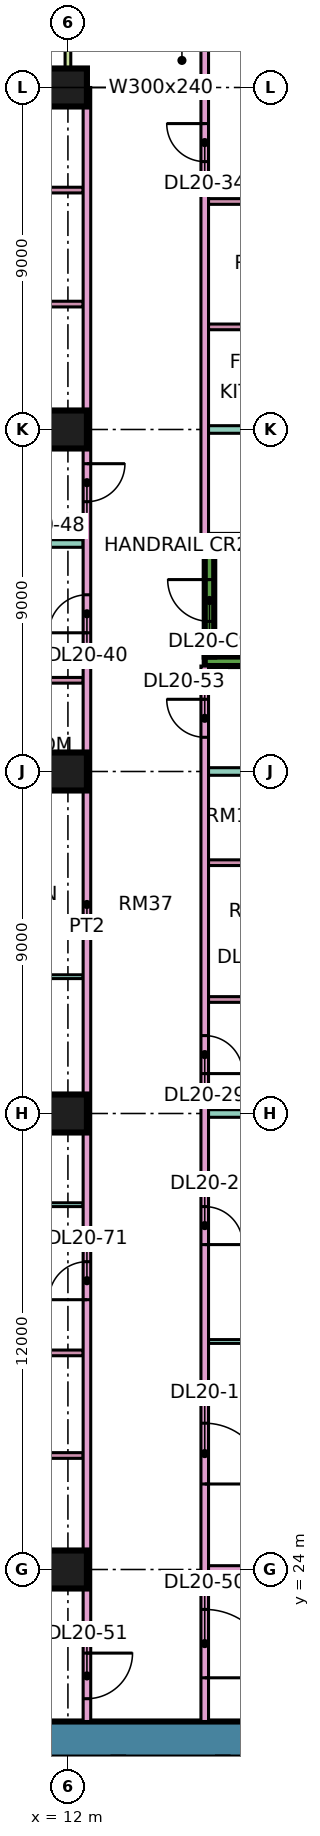
"""IFC4 building model, lengths in metres.
Left out: names, types, materials, properties, quantities, classifications, styles, units other than length and angle.
Written with IfcOpenShell. Run it as: python <this file> out.ifc"""

import sys

from ifc_helpers import new_model, si_unit, direction, frame, frame_2d, origin, origin_2d, place, context, subcontext, project, spatial, rectangle, extrude, element, fill, save


model = new_model("IFC4")
c1 = context("Model", 3, precision=1e-05, world=origin(), true_north=direction((0.0, 1.0)))
c2 = subcontext(c1, "Body", "Model", "MODEL_VIEW")
j1 = project(units=[si_unit("LENGTHUNIT", "METRE"), si_unit("PLANEANGLEUNIT", "RADIAN")], contexts=[c1])
p1 = place(None, origin())
s1 = spatial("IfcSite", under=j1, at=p1, CompositionType="ELEMENT")
p2 = place(p1, origin())
s2 = spatial("IfcBuilding", under=s1, at=p2, CompositionType="ELEMENT")
p3 = place(p2, frame((0.0, 0.0, 91.9)))
s3 = spatial("IfcBuildingStorey", under=s2, at=p3, CompositionType="ELEMENT", Elevation=91.9)
for number, where, z_axis, x_axis in (
    (1, (12.0, 24.0, 0.0), (0.0, 0.0, 1.0), (1.0, 0.0, 0.0)),
    (2, (12.0, 36.0, 0.0), (0.0, 0.0, 1.0), (1.0, 0.0, 0.0)),
    (3, (12.0, 45.0, 0.0), (0.0, 0.0, 1.0), (1.0, 0.0, 0.0)),
    (4, (12.0, 54.0, 0.0), (0.0, 0.0, 1.0), (1.0, 0.0, 0.0)),
    (5, (12.0, 63.0, 0.0), (0.0, 0.0, 1.0), (1.0, 0.0, 0.0)),
):
    element("IfcColumn", number, at=place(p3, frame(where, z_axis=z_axis, x_axis=x_axis)), inside=s3, PredefinedType="COLUMN", context=c2, shape_type="SweptSolid", body=[
        extrude(rectangle(XDim=1.0, YDim=1.0, at=origin_2d()), origin(), (0.0, 0.0, 1.0), 3.75),
    ])
p4 = place(p3, frame((9.0, 19.525, 0.0), z_axis=(0.0, 0.0, 1.0), x_axis=(1.0, 0.0, 0.0)))
e6 = element("IfcWall", 6, at=p4, inside=s3, PredefinedType="SHEAR", context=c2, shape_type="SweptSolid", body=[
    extrude(rectangle(XDim=25.0, YDim=0.95, at=frame_2d((12.5, 0.0))), origin(), (0.0, 0.0, 1.0), 3.75),
])
p5 = place(p4, frame((19.1, 0.0, 0.0)))
e7 = element("IfcOpeningElement", 7, at=p5, cuts=e6, PredefinedType="OPENING", context=c2, shape_type="SweptSolid", body=[
    extrude(rectangle(XDim=1.8, YDim=2.4, at=frame_2d((0.9, 1.2))), frame((0.0, 0.485, 0.0), z_axis=(0.0, -1.0, 0.0), x_axis=(1.0, 0.0, 0.0)), (0.0, 0.0, 1.0), 0.97),
])
for number, where, z_axis, x_axis in (
    (8, (15.6, 47.9, 0.0), (0.0, 0.0, 1.0), (1.0, 0.0, 0.0)),
    (9, (15.6, 51.1, 0.0), (0.0, 0.0, 1.0), (1.0, 0.0, 0.0)),
):
    element("IfcWall", number, at=place(p3, frame(where, z_axis=z_axis, x_axis=x_axis)), inside=s3, PredefinedType="SHEAR", context=c2, shape_type="SweptSolid", body=[
        extrude(rectangle(XDim=7.0, YDim=0.25, at=frame_2d((3.5, 0.0))), origin(), (0.0, 0.0, 1.0), 3.75),
    ])
p6 = place(p3, frame((15.725, 48.025, 0.0), z_axis=(0.0, 0.0, 1.0), x_axis=(0.0, 1.0, 0.0)))
e10 = element("IfcWall", 10, at=p6, inside=s3, PredefinedType="SHEAR", context=c2, shape_type="SweptSolid", body=[
    extrude(rectangle(XDim=2.95, YDim=0.25, at=frame_2d((1.475, 0.0))), origin(), (0.0, 0.0, 1.0), 3.75),
])
p7 = place(p6, frame((0.925, 0.0, 0.0)))
e11 = element("IfcOpeningElement", 11, at=p7, cuts=e10, PredefinedType="OPENING", context=c2, shape_type="SweptSolid", body=[
    extrude(rectangle(XDim=1.1, YDim=2.2, at=frame_2d((0.55, 1.1))), frame((0.0, 0.135, 0.0), z_axis=(0.0, -1.0, 0.0), x_axis=(1.0, 0.0, 0.0)), (0.0, 0.0, 1.0), 0.27),
])
p8 = place(p3, frame((11.925, 63.0, 0.0), z_axis=(0.0, 0.0, 1.0), x_axis=(-1.0, 0.0, 0.0)))
e12 = element("IfcWall", 12, at=p8, inside=s3, PredefinedType="SOLIDWALL", context=c2, shape_type="SweptSolid", body=[
    extrude(rectangle(XDim=10.35, YDim=0.15, at=frame_2d((5.175, 0.0))), origin(), (0.0, 0.0, 1.0), 3.35),
])
p9 = place(p8, frame((1.175, 0.0, 0.45)))
e13 = element("IfcOpeningElement", 13, at=p9, cuts=e12, PredefinedType="OPENING", context=c2, shape_type="SweptSolid", body=[
    extrude(rectangle(XDim=3.0, YDim=2.4, at=frame_2d((1.5, 1.2))), frame((0.0, 0.085, 0.0), z_axis=(0.0, -1.0, 0.0), x_axis=(1.0, 0.0, 0.0)), (0.0, 0.0, 1.0), 0.17),
])
p10 = place(p8, frame((6.688, 0.0, 0.0)))
e14 = element("IfcOpeningElement", 14, at=p10, cuts=e12, PredefinedType="OPENING", context=c2, shape_type="SweptSolid", body=[
    extrude(rectangle(XDim=1.8, YDim=2.4, at=frame_2d((0.9, 1.2))), frame((0.0, 0.085, 0.0), z_axis=(0.0, -1.0, 0.0), x_axis=(1.0, 0.0, 0.0)), (0.0, 0.0, 1.0), 0.17),
])
p11 = place(p3, frame((12.0, 64.5, 0.0), z_axis=(0.0, 0.0, 1.0), x_axis=(0.0, -1.0, 0.0)))
e15 = element("IfcWall", 15, at=p11, inside=s3, PredefinedType="SOLIDWALL", context=c2, shape_type="SweptSolid", body=[
    extrude(rectangle(XDim=1.5, YDim=0.15, at=frame_2d((0.75, 0.0))), origin(), (0.0, 0.0, 1.0), 3.35),
])
p12 = place(p3, frame((-1.35, 22.4, 0.0), z_axis=(0.0, 0.0, 1.0), x_axis=(1.0, 0.0, 0.0)))
e16 = element("IfcWall", 16, at=p12, inside=s3, PredefinedType="PARTITIONING", context=c2, shape_type="SweptSolid", body=[
    extrude(rectangle(XDim=13.75, YDim=0.2, at=frame_2d((6.875, 0.0))), origin(), (0.0, 0.0, 1.0), 3.35),
])
p13 = place(p3, frame((0.0, 36.0, 0.0), z_axis=(0.0, 0.0, 1.0), x_axis=(1.0, 0.0, 0.0)))
e17 = element("IfcWall", 17, at=p13, inside=s3, PredefinedType="PARTITIONING", context=c2, shape_type="SweptSolid", body=[
    extrude(rectangle(XDim=12.4, YDim=0.2, at=frame_2d((6.2, 0.0))), origin(), (0.0, 0.0, 1.0), 3.35),
])
p14 = place(p3, frame((0.074, 51.0, 0.0), z_axis=(0.0, 0.0, 1.0), x_axis=(1.0, 0.0, 0.0)))
e18 = element("IfcWall", 18, at=p14, inside=s3, PredefinedType="PARTITIONING", context=c2, shape_type="SweptSolid", body=[
    extrude(rectangle(XDim=12.326, YDim=0.2, at=frame_2d((6.163, 0.0))), origin(), (0.0, 0.0, 1.0), 3.35),
])
p15 = place(p3, frame((7.05, 33.6, 0.0), z_axis=(0.0, 0.0, 1.0), x_axis=(1.0, 0.0, 0.0)))
e19 = element("IfcWall", 19, at=p15, inside=s3, PredefinedType="PARTITIONING", context=c2, shape_type="SweptSolid", body=[
    extrude(rectangle(XDim=5.35, YDim=0.1, at=frame_2d((2.675, 0.0))), origin(), (0.0, 0.0, 1.0), 3.35),
])
for number, where, z_axis, x_axis in (
    (20, (7.175, 27.0, 0.0), (0.0, 0.0, 1.0), (1.0, 0.0, 0.0)),
    (21, (7.175, 29.7, 0.0), (0.0, 0.0, 1.0), (1.0, 0.0, 0.0)),
    (22, (7.175, 54.3, 0.0), (0.0, 0.0, 1.0), (1.0, 0.0, 0.0)),
    (23, (7.175, 57.3, 0.0), (0.0, 0.0, 1.0), (1.0, 0.0, 0.0)),
    (24, (7.175, 60.3, 0.0), (0.0, 0.0, 1.0), (1.0, 0.0, 0.0)),
):
    element("IfcWall", number, at=place(p3, frame(where, z_axis=z_axis, x_axis=x_axis)), inside=s3, PredefinedType="PARTITIONING", context=c2, shape_type="SweptSolid", body=[
        extrude(rectangle(XDim=5.225, YDim=0.15, at=frame_2d((2.612, 0.0))), origin(), (0.0, 0.0, 1.0), 3.35),
    ])
p16 = place(p3, frame((8.375, 39.6, 0.0), z_axis=(0.0, 0.0, 1.0), x_axis=(1.0, 0.0, 0.0)))
e25 = element("IfcWall", 25, at=p16, inside=s3, PredefinedType="PARTITIONING", context=c2, shape_type="SweptSolid", body=[
    extrude(rectangle(XDim=4.025, YDim=0.1, at=frame_2d((2.012, 0.0))), origin(), (0.0, 0.0, 1.0), 3.35),
])
for number, where, z_axis, x_axis in (
    (26, (8.375, 44.7, 0.0), (0.0, 0.0, 1.0), (1.0, 0.0, 0.0)),
    (27, (8.375, 47.4, 0.0), (0.0, 0.0, 1.0), (1.0, 0.0, 0.0)),
):
    element("IfcWall", number, at=place(p3, frame(where, z_axis=z_axis, x_axis=x_axis)), inside=s3, PredefinedType="PARTITIONING", context=c2, shape_type="SweptSolid", body=[
        extrude(rectangle(XDim=4.025, YDim=0.15, at=frame_2d((2.012, 0.0))), origin(), (0.0, 0.0, 1.0), 3.35),
    ])
p17 = place(p3, frame((12.5, 20.0, 0.0), z_axis=(0.0, 0.0, 1.0), x_axis=(0.0, 1.0, 0.0)))
e28 = element("IfcWall", 28, at=p17, inside=s3, PredefinedType="PARTITIONING", context=c2, shape_type="SweptSolid", body=[
    extrude(rectangle(XDim=43.0, YDim=0.2, at=frame_2d((21.5, 0.0))), origin(), (0.0, 0.0, 1.0), 3.35),
])
p18 = place(p17, frame((28.65, 0.0, 0.0)))
e29 = element("IfcOpeningElement", 29, at=p18, cuts=e28, PredefinedType="OPENING", context=c2, shape_type="SweptSolid", body=[
    extrude(rectangle(XDim=1.0, YDim=2.1, at=frame_2d((0.5, 1.05))), frame((0.0, 0.11, 0.0), z_axis=(0.0, -1.0, 0.0), x_axis=(1.0, 0.0, 0.0)), (0.0, 0.0, 1.0), 0.22),
])
p19 = place(p17, frame((32.1, 0.0, 0.0)))
e30 = element("IfcOpeningElement", 30, at=p19, cuts=e28, PredefinedType="OPENING", context=c2, shape_type="SweptSolid", body=[
    extrude(rectangle(XDim=1.0, YDim=2.1, at=frame_2d((0.5, 1.05))), frame((0.0, 0.11, 0.0), z_axis=(0.0, -1.0, 0.0), x_axis=(1.0, 0.0, 0.0)), (0.0, 0.0, 1.0), 0.22),
])
p20 = place(p17, frame((0.6, 0.0, 0.0)))
e31 = element("IfcOpeningElement", 31, at=p20, cuts=e28, PredefinedType="OPENING", context=c2, shape_type="SweptSolid", body=[
    extrude(rectangle(XDim=1.2, YDim=2.1, at=frame_2d((0.6, 1.05))), frame((0.0, 0.11, 0.0), z_axis=(0.0, -1.0, 0.0), x_axis=(1.0, 0.0, 0.0)), (0.0, 0.0, 1.0), 0.22),
])
p21 = place(p17, frame((11.1, 0.0, 0.0)))
e32 = element("IfcOpeningElement", 32, at=p21, cuts=e28, PredefinedType="OPENING", context=c2, shape_type="SweptSolid", body=[
    extrude(rectangle(XDim=1.0, YDim=2.1, at=frame_2d((0.5, 1.05))), frame((0.0, 0.11, 0.0), z_axis=(0.0, -1.0, 0.0), x_axis=(1.0, 0.0, 0.0)), (0.0, 0.0, 1.0), 0.22),
])
p22 = place(p3, frame((15.6, 20.0, 0.0), z_axis=(0.0, 0.0, 1.0), x_axis=(0.0, 1.0, 0.0)))
e33 = element("IfcWall", 33, at=p22, inside=s3, PredefinedType="PARTITIONING", context=c2, shape_type="SweptSolid", body=[
    extrude(rectangle(XDim=27.775, YDim=0.2, at=frame_2d((13.887, 0.0))), origin(), (0.0, 0.0, 1.0), 3.35),
])
p23 = place(p22, frame((6.25, 0.0, 0.0)))
e34 = element("IfcOpeningElement", 34, at=p23, cuts=e33, PredefinedType="OPENING", context=c2, shape_type="SweptSolid", body=[
    extrude(rectangle(XDim=1.6, YDim=2.1, at=frame_2d((0.8, 1.05))), frame((0.0, 0.11, 0.0), z_axis=(0.0, -1.0, 0.0), x_axis=(1.0, 0.0, 0.0)), (0.0, 0.0, 1.0), 0.22),
])
p24 = place(p22, frame((12.55, 0.0, 0.0)))
e35 = element("IfcOpeningElement", 35, at=p24, cuts=e33, PredefinedType="OPENING", context=c2, shape_type="SweptSolid", body=[
    extrude(rectangle(XDim=1.0, YDim=2.1, at=frame_2d((0.5, 1.05))), frame((0.0, 0.11, 0.0), z_axis=(0.0, -1.0, 0.0), x_axis=(1.0, 0.0, 0.0)), (0.0, 0.0, 1.0), 0.22),
])
p25 = place(p22, frame((17.05, 0.0, 0.0)))
e36 = element("IfcOpeningElement", 36, at=p25, cuts=e33, PredefinedType="OPENING", context=c2, shape_type="SweptSolid", body=[
    extrude(rectangle(XDim=1.0, YDim=2.1, at=frame_2d((0.5, 1.05))), frame((0.0, 0.11, 0.0), z_axis=(0.0, -1.0, 0.0), x_axis=(1.0, 0.0, 0.0)), (0.0, 0.0, 1.0), 0.22),
])
p26 = place(p22, frame((1.15, 0.0, 0.0)))
e37 = element("IfcOpeningElement", 37, at=p26, cuts=e33, PredefinedType="OPENING", context=c2, shape_type="SweptSolid", body=[
    extrude(rectangle(XDim=1.8, YDim=2.1, at=frame_2d((0.9, 1.05))), frame((0.0, 0.11, 0.0), z_axis=(0.0, -1.0, 0.0), x_axis=(1.0, 0.0, 0.0)), (0.0, 0.0, 1.0), 0.22),
])
p27 = place(p22, frame((25.9, 0.0, 0.0)))
e38 = element("IfcOpeningElement", 38, at=p27, cuts=e33, PredefinedType="OPENING", context=c2, shape_type="SweptSolid", body=[
    extrude(rectangle(XDim=1.0, YDim=2.1, at=frame_2d((0.5, 1.05))), frame((0.0, 0.11, 0.0), z_axis=(0.0, -1.0, 0.0), x_axis=(1.0, 0.0, 0.0)), (0.0, 0.0, 1.0), 0.22),
])
p28 = place(p3, frame((15.6, 51.225, 0.0), z_axis=(0.0, 0.0, 1.0), x_axis=(0.0, 1.0, 0.0)))
e39 = element("IfcWall", 39, at=p28, inside=s3, PredefinedType="PARTITIONING", context=c2, shape_type="SweptSolid", body=[
    extrude(rectangle(XDim=13.125, YDim=0.2, at=frame_2d((6.562, 0.0))), origin(), (0.0, 0.0, 1.0), 3.35),
])
p29 = place(p28, frame((9.825, 0.0, 0.0)))
e40 = element("IfcOpeningElement", 40, at=p29, cuts=e39, PredefinedType="OPENING", context=c2, shape_type="SweptSolid", body=[
    extrude(rectangle(XDim=1.0, YDim=2.1, at=frame_2d((0.5, 1.05))), frame((0.0, 0.11, 0.0), z_axis=(0.0, -1.0, 0.0), x_axis=(1.0, 0.0, 0.0)), (0.0, 0.0, 1.0), 0.22),
])
p30 = place(p3, frame((15.7, 24.0, 0.0), z_axis=(0.0, 0.0, 1.0), x_axis=(1.0, 0.0, 0.0)))
e41 = element("IfcWall", 41, at=p30, inside=s3, PredefinedType="PARTITIONING", context=c2, shape_type="SweptSolid", body=[
    extrude(rectangle(XDim=5.8, YDim=0.2, at=frame_2d((2.9, 0.0))), origin(), (0.0, 0.0, 1.0), 3.35),
])
p31 = place(p3, frame((15.7, 30.0, 0.0), z_axis=(0.0, 0.0, 1.0), x_axis=(1.0, 0.0, 0.0)))
e42 = element("IfcWall", 42, at=p31, inside=s3, PredefinedType="PARTITIONING", context=c2, shape_type="SweptSolid", body=[
    extrude(rectangle(XDim=5.8, YDim=0.1, at=frame_2d((2.9, 0.0))), origin(), (0.0, 0.0, 1.0), 3.35),
])
p32 = place(p3, frame((15.7, 36.0, 0.0), z_axis=(0.0, 0.0, 1.0), x_axis=(1.0, 0.0, 0.0)))
e43 = element("IfcWall", 43, at=p32, inside=s3, PredefinedType="PARTITIONING", context=c2, shape_type="SweptSolid", body=[
    extrude(rectangle(XDim=8.3, YDim=0.2, at=frame_2d((4.15, 0.0))), origin(), (0.0, 0.0, 1.0), 3.35),
])
p33 = place(p3, frame((15.7, 39.0, 0.0), z_axis=(0.0, 0.0, 1.0), x_axis=(1.0, 0.0, 0.0)))
e44 = element("IfcWall", 44, at=p33, inside=s3, PredefinedType="PARTITIONING", context=c2, shape_type="SweptSolid", body=[
    extrude(rectangle(XDim=2.525, YDim=0.15, at=frame_2d((1.263, 0.0))), origin(), (0.0, 0.0, 1.0), 3.35),
])
p34 = place(p33, frame((0.9, 0.0, 0.0)))
e45 = element("IfcOpeningElement", 45, at=p34, cuts=e44, PredefinedType="OPENING", context=c2, shape_type="SweptSolid", body=[
    extrude(rectangle(XDim=0.8, YDim=2.1, at=frame_2d((0.4, 1.05))), frame((0.0, 0.085, 0.0), z_axis=(0.0, -1.0, 0.0), x_axis=(1.0, 0.0, 0.0)), (0.0, 0.0, 1.0), 0.17),
])
p35 = place(p3, frame((15.7, 42.6, 0.0), z_axis=(0.0, 0.0, 1.0), x_axis=(1.0, 0.0, 0.0)))
e46 = element("IfcWall", 46, at=p35, inside=s3, PredefinedType="PARTITIONING", context=c2, shape_type="SweptSolid", body=[
    extrude(rectangle(XDim=2.525, YDim=0.15, at=frame_2d((1.263, 0.0))), origin(), (0.0, 0.0, 1.0), 3.35),
])
p36 = place(p3, frame((15.7, 45.0, 0.0), z_axis=(0.0, 0.0, 1.0), x_axis=(1.0, 0.0, 0.0)))
e47 = element("IfcWall", 47, at=p36, inside=s3, PredefinedType="PARTITIONING", context=c2, shape_type="SweptSolid", body=[
    extrude(rectangle(XDim=8.3, YDim=0.2, at=frame_2d((4.15, 0.0))), origin(), (0.0, 0.0, 1.0), 3.35),
])
p37 = place(p3, frame((15.7, 54.0, 0.0), z_axis=(0.0, 0.0, 1.0), x_axis=(1.0, 0.0, 0.0)))
e48 = element("IfcWall", 48, at=p37, inside=s3, PredefinedType="PARTITIONING", context=c2, shape_type="SweptSolid", body=[
    extrude(rectangle(XDim=8.226, YDim=0.2, at=frame_2d((4.113, 0.0))), origin(), (0.0, 0.0, 1.0), 3.35),
])
for number, where, z_axis, x_axis in (
    (49, (15.7, 56.7, 0.0), (0.0, 0.0, 1.0), (1.0, 0.0, 0.0)),
    (50, (15.7, 60.0, 0.0), (0.0, 0.0, 1.0), (1.0, 0.0, 0.0)),
):
    element("IfcWall", number, at=place(p3, frame(where, z_axis=z_axis, x_axis=x_axis)), inside=s3, PredefinedType="PARTITIONING", context=c2, shape_type="SweptSolid", body=[
        extrude(rectangle(XDim=2.825, YDim=0.15, at=frame_2d((1.413, 0.0))), origin(), (0.0, 0.0, 1.0), 3.35),
    ])
p38 = place(p7, frame((1.1, 0.0, 0.0), z_axis=(0.0, 0.0, 1.0), x_axis=(-1.0, 0.0, 0.0)))
e51 = element("IfcDoor", 51, at=p38, inside=s3, OperationType="SINGLE_SWING_RIGHT", PredefinedType="DOOR", context=c2, shape_type="SweptSolid", body=[
    extrude(rectangle(XDim=1.1, YDim=2.2, at=frame_2d((0.55, 1.1))), frame((0.0, 0.025, 0.0), z_axis=(0.0, -1.0, 0.0), x_axis=(1.0, 0.0, 0.0)), (0.0, 0.0, 1.0), 0.05),
])
fill(e11, e51)
p39 = place(p23, frame((1.6, 0.0, 0.0), z_axis=(0.0, 0.0, 1.0), x_axis=(-1.0, 0.0, 0.0)))
e52 = element("IfcDoor", 52, at=p39, inside=s3, OperationType="DOUBLE_DOOR_SINGLE_SWING", PredefinedType="DOOR", context=c2, shape_type="SweptSolid", body=[
    extrude(rectangle(XDim=1.6, YDim=2.1, at=frame_2d((0.8, 1.05))), frame((0.0, 0.025, 0.0), z_axis=(0.0, -1.0, 0.0), x_axis=(1.0, 0.0, 0.0)), (0.0, 0.0, 1.0), 0.05),
])
fill(e34, e52)
p40 = place(p24, frame((1.0, 0.0, 0.0), z_axis=(0.0, 0.0, 1.0), x_axis=(-1.0, 0.0, 0.0)))
e53 = element("IfcDoor", 53, at=p40, inside=s3, OperationType="SINGLE_SWING_LEFT", PredefinedType="DOOR", context=c2, shape_type="SweptSolid", body=[
    extrude(rectangle(XDim=1.0, YDim=2.1, at=frame_2d((0.5, 1.05))), frame((0.0, 0.025, 0.0), z_axis=(0.0, -1.0, 0.0), x_axis=(1.0, 0.0, 0.0)), (0.0, 0.0, 1.0), 0.05),
])
fill(e35, e53)
p41 = place(p25, frame((1.0, 0.0, 0.0), z_axis=(0.0, 0.0, 1.0), x_axis=(-1.0, 0.0, 0.0)))
e54 = element("IfcDoor", 54, at=p41, inside=s3, OperationType="SINGLE_SWING_LEFT", PredefinedType="DOOR", context=c2, shape_type="SweptSolid", body=[
    extrude(rectangle(XDim=1.0, YDim=2.1, at=frame_2d((0.5, 1.05))), frame((0.0, 0.025, 0.0), z_axis=(0.0, -1.0, 0.0), x_axis=(1.0, 0.0, 0.0)), (0.0, 0.0, 1.0), 0.05),
])
fill(e36, e54)
p42 = place(p29, frame((1.0, 0.0, 0.0), z_axis=(0.0, 0.0, 1.0), x_axis=(-1.0, 0.0, 0.0)))
e55 = element("IfcDoor", 55, at=p42, inside=s3, OperationType="SINGLE_SWING_RIGHT", PredefinedType="DOOR", context=c2, shape_type="SweptSolid", body=[
    extrude(rectangle(XDim=1.0, YDim=2.1, at=frame_2d((0.5, 1.05))), frame((0.0, 0.025, 0.0), z_axis=(0.0, -1.0, 0.0), x_axis=(1.0, 0.0, 0.0)), (0.0, 0.0, 1.0), 0.05),
])
fill(e40, e55)
p43 = place(p18, origin())
e56 = element("IfcDoor", 56, at=p43, inside=s3, OperationType="SINGLE_SWING_LEFT", PredefinedType="DOOR", context=c2, shape_type="SweptSolid", body=[
    extrude(rectangle(XDim=1.0, YDim=2.1, at=frame_2d((0.5, 1.05))), frame((0.0, 0.025, 0.0), z_axis=(0.0, -1.0, 0.0), x_axis=(1.0, 0.0, 0.0)), (0.0, 0.0, 1.0), 0.05),
])
fill(e29, e56)
p44 = place(p19, origin())
e57 = element("IfcDoor", 57, at=p44, inside=s3, OperationType="SINGLE_SWING_RIGHT", PredefinedType="DOOR", context=c2, shape_type="SweptSolid", body=[
    extrude(rectangle(XDim=1.0, YDim=2.1, at=frame_2d((0.5, 1.05))), frame((0.0, 0.025, 0.0), z_axis=(0.0, -1.0, 0.0), x_axis=(1.0, 0.0, 0.0)), (0.0, 0.0, 1.0), 0.05),
])
fill(e30, e57)
p45 = place(p26, frame((1.8, 0.0, 0.0), z_axis=(0.0, 0.0, 1.0), x_axis=(-1.0, 0.0, 0.0)))
e58 = element("IfcDoor", 58, at=p45, inside=s3, OperationType="DOUBLE_DOOR_SINGLE_SWING", PredefinedType="DOOR", context=c2, shape_type="SweptSolid", body=[
    extrude(rectangle(XDim=1.8, YDim=2.1, at=frame_2d((0.9, 1.05))), frame((0.0, 0.025, 0.0), z_axis=(0.0, -1.0, 0.0), x_axis=(1.0, 0.0, 0.0)), (0.0, 0.0, 1.0), 0.05),
])
fill(e37, e58)
p46 = place(p20, origin())
e59 = element("IfcDoor", 59, at=p46, inside=s3, OperationType="SINGLE_SWING_RIGHT", PredefinedType="DOOR", context=c2, shape_type="SweptSolid", body=[
    extrude(rectangle(XDim=1.2, YDim=2.1, at=frame_2d((0.6, 1.05))), frame((0.0, 0.025, 0.0), z_axis=(0.0, -1.0, 0.0), x_axis=(1.0, 0.0, 0.0)), (0.0, 0.0, 1.0), 0.05),
])
fill(e31, e59)
p47 = place(p27, frame((1.0, 0.0, 0.0), z_axis=(0.0, 0.0, 1.0), x_axis=(-1.0, 0.0, 0.0)))
e60 = element("IfcDoor", 60, at=p47, inside=s3, OperationType="SINGLE_SWING_RIGHT", PredefinedType="DOOR", context=c2, shape_type="SweptSolid", body=[
    extrude(rectangle(XDim=1.0, YDim=2.1, at=frame_2d((0.5, 1.05))), frame((0.0, 0.025, 0.0), z_axis=(0.0, -1.0, 0.0), x_axis=(1.0, 0.0, 0.0)), (0.0, 0.0, 1.0), 0.05),
])
fill(e38, e60)
p48 = place(p21, origin())
e61 = element("IfcDoor", 61, at=p48, inside=s3, OperationType="SINGLE_SWING_LEFT", PredefinedType="DOOR", context=c2, shape_type="SweptSolid", body=[
    extrude(rectangle(XDim=1.0, YDim=2.1, at=frame_2d((0.5, 1.05))), frame((0.0, 0.025, 0.0), z_axis=(0.0, -1.0, 0.0), x_axis=(1.0, 0.0, 0.0)), (0.0, 0.0, 1.0), 0.05),
])
fill(e32, e61)
save(model, sys.argv[1])
